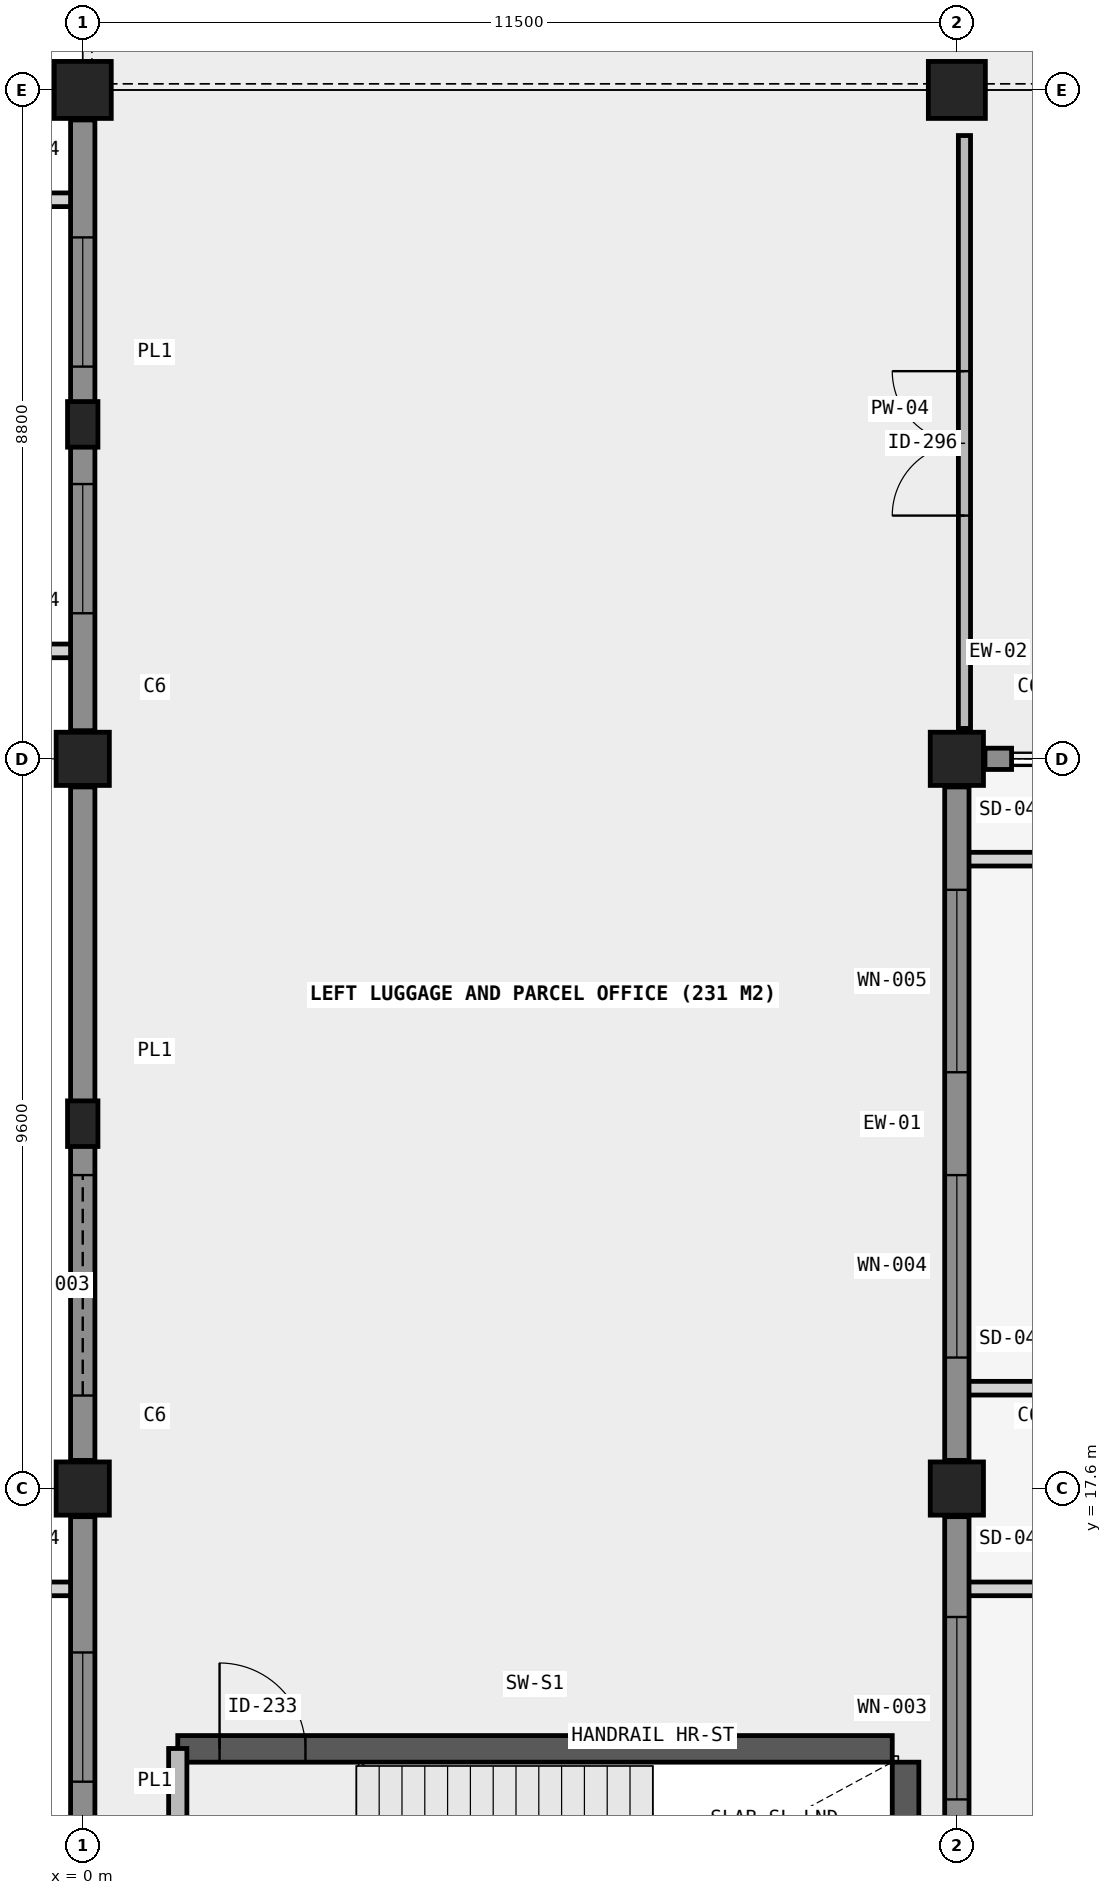
"""IFC4 building model, lengths in metres.
Left out: names, types, materials, properties, quantities, classifications, styles, units other than length and angle.
Written with IfcOpenShell. Run it as: python <this file> out.ifc"""

import sys

from ifc_helpers import new_model, si_unit, direction, frame, frame_2d, origin, origin_2d, place, context, subcontext, project, spatial, rectangle, extrude, element, fill, save


model = new_model("IFC4")
c1 = context("Model", 3, precision=1e-05, world=origin(), true_north=direction((0.0, 1.0)))
c2 = subcontext(c1, "Body", "Model", "MODEL_VIEW")
j1 = project(units=[si_unit("LENGTHUNIT", "METRE"), si_unit("PLANEANGLEUNIT", "RADIAN")], contexts=[c1])
p1 = place(None, origin())
s1 = spatial("IfcSite", under=j1, at=p1, CompositionType="ELEMENT")
p2 = place(p1, origin())
s2 = spatial("IfcBuilding", under=s1, at=p2, CompositionType="ELEMENT")
p3 = place(p2, origin())
s3 = spatial("IfcBuildingStorey", under=s2, at=p3, CompositionType="ELEMENT", Elevation=0.0)
for number, where, z_axis, x_axis in (
    (1, (0.0, 17.6, 0.0), (0.0, 0.0, 1.0), (1.0, 0.0, 0.0)),
    (2, (0.0, 27.2, 0.0), (0.0, 0.0, 1.0), (1.0, 0.0, 0.0)),
):
    element("IfcColumn", number, at=place(p3, frame(where, z_axis=z_axis, x_axis=x_axis)), inside=s3, PredefinedType="COLUMN", context=c2, shape_type="SweptSolid", body=[
        extrude(rectangle(XDim=0.7, YDim=0.7, at=origin_2d()), origin(), (0.0, 0.0, 1.0), 4.2),
    ])
p4 = place(p3, frame((0.0, 36.0, 0.0), z_axis=(0.0, 0.0, 1.0), x_axis=(1.0, 0.0, 0.0)))
e3 = element("IfcColumn", 3, at=p4, inside=s3, PredefinedType="COLUMN", context=c2, shape_type="SweptSolid", body=[
    extrude(rectangle(XDim=0.75, YDim=0.75, at=origin_2d()), origin(), (0.0, 0.0, 1.0), 4.2),
])
for number, where, z_axis, x_axis in (
    (4, (11.5, 17.6, 0.0), (0.0, 0.0, 1.0), (1.0, 0.0, 0.0)),
    (5, (11.5, 27.2, 0.0), (0.0, 0.0, 1.0), (1.0, 0.0, 0.0)),
):
    element("IfcColumn", number, at=place(p3, frame(where, z_axis=z_axis, x_axis=x_axis)), inside=s3, PredefinedType="COLUMN", context=c2, shape_type="SweptSolid", body=[
        extrude(rectangle(XDim=0.7, YDim=0.7, at=origin_2d()), origin(), (0.0, 0.0, 1.0), 4.2),
    ])
p5 = place(p3, frame((11.5, 36.0, 0.0), z_axis=(0.0, 0.0, 1.0), x_axis=(1.0, 0.0, 0.0)))
e6 = element("IfcColumn", 6, at=p5, inside=s3, PredefinedType="COLUMN", context=c2, shape_type="SweptSolid", body=[
    extrude(rectangle(XDim=0.75, YDim=0.75, at=origin_2d()), origin(), (0.0, 0.0, 1.0), 4.2),
])
for number, where, z_axis, x_axis in (
    (7, (0.0, 22.4, 0.0), (0.0, 0.0, 1.0), (1.0, 0.0, 0.0)),
    (8, (0.0, 31.6, 0.0), (0.0, 0.0, 1.0), (1.0, 0.0, 0.0)),
):
    element("IfcColumn", number, at=place(p3, frame(where, z_axis=z_axis, x_axis=x_axis)), inside=s3, PredefinedType="PILASTER", context=c2, shape_type="SweptSolid", body=[
        extrude(rectangle(XDim=0.4, YDim=0.6, at=origin_2d()), origin(), (0.0, 0.0, 1.0), 4.2),
    ])
p6 = place(p3, frame((1.25, 14.175, 0.0), z_axis=(0.0, 0.0, 1.0), x_axis=(1.0, 0.0, 0.0)))
e9 = element("IfcWall", 9, at=p6, inside=s3, PredefinedType="SHEAR", context=c2, shape_type="SweptSolid", body=[
    extrude(rectangle(XDim=9.4, YDim=0.35, at=frame_2d((4.7, 0.0))), origin(), (0.0, 0.0, 1.0), 4.2),
])
p7 = place(p6, frame((0.55, 0.0, 0.0)))
e10 = element("IfcOpeningElement", 10, at=p7, cuts=e9, PredefinedType="OPENING", context=c2, shape_type="SweptSolid", body=[
    extrude(rectangle(XDim=1.13, YDim=2.15, at=frame_2d((0.565, 1.075))), frame((0.0, 0.185, 0.0), z_axis=(0.0, -1.0, 0.0), x_axis=(1.0, 0.0, 0.0)), (0.0, 0.0, 1.0), 0.37),
])
p8 = place(p3, frame((10.825, 10.2, 0.0), z_axis=(0.0, 0.0, 1.0), x_axis=(0.0, 1.0, 0.0)))
e11 = element("IfcWall", 11, at=p8, inside=s3, PredefinedType="SHEAR", context=c2, shape_type="SweptSolid", body=[
    extrude(rectangle(XDim=3.8, YDim=0.35, at=frame_2d((1.9, 0.0))), origin(), (0.0, 0.0, 1.0), 4.2),
])
p9 = place(p3, frame((11.5, 8.47, 0.0), z_axis=(0.0, 0.0, 1.0), x_axis=(0.0, 1.0, 0.0)))
e12 = element("IfcWall", 12, at=p9, inside=s3, PredefinedType="SOLIDWALL", context=c2, shape_type="SweptSolid", body=[
    extrude(rectangle(XDim=8.76, YDim=0.32, at=frame_2d((4.38, 0.0))), origin(), (0.0, 0.0, 1.0), 3.0),
])
p10 = place(p9, frame((1.32, 0.0, 0.84)))
e13 = element("IfcOpeningElement", 13, at=p10, cuts=e12, PredefinedType="OPENING", context=c2, shape_type="SweptSolid", body=[
    extrude(rectangle(XDim=2.4, YDim=2.1, at=frame_2d((1.2, 1.05))), frame((0.0, 0.17, 0.0), z_axis=(0.0, -1.0, 0.0), x_axis=(1.0, 0.0, 0.0)), (0.0, 0.0, 1.0), 0.34),
])
p11 = place(p9, frame((5.04, 0.0, 0.84)))
e14 = element("IfcOpeningElement", 14, at=p11, cuts=e12, PredefinedType="OPENING", context=c2, shape_type="SweptSolid", body=[
    extrude(rectangle(XDim=2.4, YDim=2.1, at=frame_2d((1.2, 1.05))), frame((0.0, 0.17, 0.0), z_axis=(0.0, -1.0, 0.0), x_axis=(1.0, 0.0, 0.0)), (0.0, 0.0, 1.0), 0.34),
])
p12 = place(p3, frame((11.5, 17.97, 0.0), z_axis=(0.0, 0.0, 1.0), x_axis=(0.0, 1.0, 0.0)))
e15 = element("IfcWall", 15, at=p12, inside=s3, PredefinedType="SOLIDWALL", context=c2, shape_type="SweptSolid", body=[
    extrude(rectangle(XDim=8.86, YDim=0.32, at=frame_2d((4.43, 0.0))), origin(), (0.0, 0.0, 1.0), 3.0),
])
p13 = place(p12, frame((1.353, 0.0, 0.84)))
e16 = element("IfcOpeningElement", 16, at=p13, cuts=e15, PredefinedType="OPENING", context=c2, shape_type="SweptSolid", body=[
    extrude(rectangle(XDim=2.4, YDim=2.1, at=frame_2d((1.2, 1.05))), frame((0.0, 0.17, 0.0), z_axis=(0.0, -1.0, 0.0), x_axis=(1.0, 0.0, 0.0)), (0.0, 0.0, 1.0), 0.34),
])
p14 = place(p12, frame((5.107, 0.0, 0.84)))
e17 = element("IfcOpeningElement", 17, at=p14, cuts=e15, PredefinedType="OPENING", context=c2, shape_type="SweptSolid", body=[
    extrude(rectangle(XDim=2.4, YDim=2.1, at=frame_2d((1.2, 1.05))), frame((0.0, 0.17, 0.0), z_axis=(0.0, -1.0, 0.0), x_axis=(1.0, 0.0, 0.0)), (0.0, 0.0, 1.0), 0.34),
])
p15 = place(p3, frame((11.87, 27.2, 0.0), z_axis=(0.0, 0.0, 1.0), x_axis=(1.0, 0.0, 0.0)))
e18 = element("IfcWall", 18, at=p15, inside=s3, PredefinedType="SOLIDWALL", context=c2, shape_type="SweptSolid", body=[
    extrude(rectangle(XDim=0.35, YDim=0.28, at=frame_2d((0.175, 0.0))), origin(), (0.0, 0.0, 1.0), 3.88),
])
p16 = place(p3, frame((0.0, 8.47, 0.0), z_axis=(0.0, 0.0, 1.0), x_axis=(0.0, 1.0, 0.0)))
e19 = element("IfcWall", 19, at=p16, inside=s3, PredefinedType="SOLIDWALL", context=c2, shape_type="SweptSolid", body=[
    extrude(rectangle(XDim=8.76, YDim=0.32, at=frame_2d((4.38, 0.0))), origin(), (0.0, 0.0, 1.0), 3.2),
])
p17 = place(p16, frame((1.787, 0.0, 0.85)))
e20 = element("IfcOpeningElement", 20, at=p17, cuts=e19, PredefinedType="OPENING", context=c2, shape_type="SweptSolid", body=[
    extrude(rectangle(XDim=1.7, YDim=1.5, at=frame_2d((0.85, 0.75))), frame((0.0, 0.17, 0.0), z_axis=(0.0, -1.0, 0.0), x_axis=(1.0, 0.0, 0.0)), (0.0, 0.0, 1.0), 0.34),
])
p18 = place(p16, frame((5.273, 0.0, 0.85)))
e21 = element("IfcOpeningElement", 21, at=p18, cuts=e19, PredefinedType="OPENING", context=c2, shape_type="SweptSolid", body=[
    extrude(rectangle(XDim=1.7, YDim=1.5, at=frame_2d((0.85, 0.75))), frame((0.0, 0.17, 0.0), z_axis=(0.0, -1.0, 0.0), x_axis=(1.0, 0.0, 0.0)), (0.0, 0.0, 1.0), 0.34),
])
p19 = place(p3, frame((0.0, 17.97, 0.0), z_axis=(0.0, 0.0, 1.0), x_axis=(0.0, 1.0, 0.0)))
e22 = element("IfcWall", 22, at=p19, inside=s3, PredefinedType="SOLIDWALL", context=c2, shape_type="SweptSolid", body=[
    extrude(rectangle(XDim=8.86, YDim=0.32, at=frame_2d((4.43, 0.0))), origin(), (0.0, 0.0, 1.0), 3.2),
])
p20 = place(p19, frame((0.854, 0.0, 0.0)))
e23 = element("IfcOpeningElement", 23, at=p20, cuts=e22, PredefinedType="OPENING", context=c2, shape_type="SweptSolid", body=[
    extrude(rectangle(XDim=2.9, YDim=2.95, at=frame_2d((1.45, 1.475))), frame((0.0, 0.17, 0.0), z_axis=(0.0, -1.0, 0.0), x_axis=(1.0, 0.0, 0.0)), (0.0, 0.0, 1.0), 0.34),
])
p21 = place(p3, frame((0.0, 27.57, 0.0), z_axis=(0.0, 0.0, 1.0), x_axis=(0.0, 1.0, 0.0)))
e24 = element("IfcWall", 24, at=p21, inside=s3, PredefinedType="SOLIDWALL", context=c2, shape_type="SweptSolid", body=[
    extrude(rectangle(XDim=8.035, YDim=0.32, at=frame_2d((4.018, 0.0))), origin(), (0.0, 0.0, 1.0), 3.2),
])
p22 = place(p21, frame((1.545, 0.0, 0.85)))
e25 = element("IfcOpeningElement", 25, at=p22, cuts=e24, PredefinedType="OPENING", context=c2, shape_type="SweptSolid", body=[
    extrude(rectangle(XDim=1.7, YDim=1.5, at=frame_2d((0.85, 0.75))), frame((0.0, 0.17, 0.0), z_axis=(0.0, -1.0, 0.0), x_axis=(1.0, 0.0, 0.0)), (0.0, 0.0, 1.0), 0.34),
])
p23 = place(p21, frame((4.79, 0.0, 0.85)))
e26 = element("IfcOpeningElement", 26, at=p23, cuts=e24, PredefinedType="OPENING", context=c2, shape_type="SweptSolid", body=[
    extrude(rectangle(XDim=1.7, YDim=1.5, at=frame_2d((0.85, 0.75))), frame((0.0, 0.17, 0.0), z_axis=(0.0, -1.0, 0.0), x_axis=(1.0, 0.0, 0.0)), (0.0, 0.0, 1.0), 0.34),
])
p24 = place(p3, frame((1.25, 10.02, 0.0), z_axis=(0.0, 0.0, 1.0), x_axis=(0.0, 1.0, 0.0)))
e27 = element("IfcWall", 27, at=p24, inside=s3, PredefinedType="SOLIDWALL", context=c2, shape_type="SweptSolid", body=[
    extrude(rectangle(XDim=4.16, YDim=0.24, at=frame_2d((2.08, 0.0))), origin(), (0.0, 0.0, 1.0), 3.88),
])
p25 = place(p3, frame((11.6, 27.6, 0.0), z_axis=(0.0, 0.0, 1.0), x_axis=(0.0, 1.0, 0.0)))
e28 = element("IfcWall", 28, at=p25, inside=s3, PredefinedType="PARTITIONING", context=c2, shape_type="SweptSolid", body=[
    extrude(rectangle(XDim=7.8, YDim=0.16, at=frame_2d((3.9, 0.0))), origin(), (0.0, 0.0, 1.0), 3.0),
])
p26 = place(p25, frame((2.8, 0.0, 0.0)))
e29 = element("IfcOpeningElement", 29, at=p26, cuts=e28, PredefinedType="OPENING", context=c2, shape_type="SweptSolid", body=[
    extrude(rectangle(XDim=1.9, YDim=2.35, at=frame_2d((0.95, 1.175))), frame((0.0, 0.09, 0.0), z_axis=(0.0, -1.0, 0.0), x_axis=(1.0, 0.0, 0.0)), (0.0, 0.0, 1.0), 0.18),
])
p27 = place(p11, origin())
e30 = element("IfcWindow", 30, at=p27, inside=s3, PartitioningType="SINGLE_PANEL", PredefinedType="WINDOW", context=c2, shape_type="SweptSolid", body=[
    extrude(rectangle(XDim=2.4, YDim=2.1, at=frame_2d((1.2, 1.05))), frame((0.0, 0.03, 0.0), z_axis=(0.0, -1.0, 0.0), x_axis=(1.0, 0.0, 0.0)), (0.0, 0.0, 1.0), 0.06),
])
fill(e14, e30)
p28 = place(p13, origin())
e31 = element("IfcWindow", 31, at=p28, inside=s3, PartitioningType="SINGLE_PANEL", PredefinedType="WINDOW", context=c2, shape_type="SweptSolid", body=[
    extrude(rectangle(XDim=2.4, YDim=2.1, at=frame_2d((1.2, 1.05))), frame((0.0, 0.03, 0.0), z_axis=(0.0, -1.0, 0.0), x_axis=(1.0, 0.0, 0.0)), (0.0, 0.0, 1.0), 0.06),
])
fill(e16, e31)
p29 = place(p14, origin())
e32 = element("IfcWindow", 32, at=p29, inside=s3, PartitioningType="SINGLE_PANEL", PredefinedType="WINDOW", context=c2, shape_type="SweptSolid", body=[
    extrude(rectangle(XDim=2.4, YDim=2.1, at=frame_2d((1.2, 1.05))), frame((0.0, 0.03, 0.0), z_axis=(0.0, -1.0, 0.0), x_axis=(1.0, 0.0, 0.0)), (0.0, 0.0, 1.0), 0.06),
])
fill(e17, e32)
p30 = place(p18, origin())
e33 = element("IfcWindow", 33, at=p30, inside=s3, PartitioningType="SINGLE_PANEL", PredefinedType="WINDOW", context=c2, shape_type="SweptSolid", body=[
    extrude(rectangle(XDim=1.7, YDim=1.5, at=frame_2d((0.85, 0.75))), frame((0.0, 0.03, 0.0), z_axis=(0.0, -1.0, 0.0), x_axis=(1.0, 0.0, 0.0)), (0.0, 0.0, 1.0), 0.06),
])
fill(e21, e33)
p31 = place(p20, origin())
e34 = element("IfcDoor", 34, at=p31, inside=s3, OperationType="ROLLINGUP", PredefinedType="GATE", context=c2, shape_type="SweptSolid", body=[
    extrude(rectangle(XDim=2.9, YDim=2.95, at=frame_2d((1.45, 1.475))), frame((0.0, 0.025, 0.0), z_axis=(0.0, -1.0, 0.0), x_axis=(1.0, 0.0, 0.0)), (0.0, 0.0, 1.0), 0.05),
])
fill(e23, e34)
p32 = place(p22, origin())
e35 = element("IfcWindow", 35, at=p32, inside=s3, PartitioningType="SINGLE_PANEL", PredefinedType="WINDOW", context=c2, shape_type="SweptSolid", body=[
    extrude(rectangle(XDim=1.7, YDim=1.5, at=frame_2d((0.85, 0.75))), frame((0.0, 0.03, 0.0), z_axis=(0.0, -1.0, 0.0), x_axis=(1.0, 0.0, 0.0)), (0.0, 0.0, 1.0), 0.06),
])
fill(e25, e35)
p33 = place(p23, origin())
e36 = element("IfcWindow", 36, at=p33, inside=s3, PartitioningType="SINGLE_PANEL", PredefinedType="WINDOW", context=c2, shape_type="SweptSolid", body=[
    extrude(rectangle(XDim=1.7, YDim=1.5, at=frame_2d((0.85, 0.75))), frame((0.0, 0.03, 0.0), z_axis=(0.0, -1.0, 0.0), x_axis=(1.0, 0.0, 0.0)), (0.0, 0.0, 1.0), 0.06),
])
fill(e26, e36)
p34 = place(p7, origin())
e37 = element("IfcDoor", 37, at=p34, inside=s3, OperationType="SINGLE_SWING_LEFT", PredefinedType="DOOR", context=c2, shape_type="SweptSolid", body=[
    extrude(rectangle(XDim=1.13, YDim=2.15, at=frame_2d((0.565, 1.075))), frame((0.0, 0.025, 0.0), z_axis=(0.0, -1.0, 0.0), x_axis=(1.0, 0.0, 0.0)), (0.0, 0.0, 1.0), 0.05),
])
fill(e10, e37)
p35 = place(p26, origin())
e38 = element("IfcDoor", 38, at=p35, inside=s3, OperationType="DOUBLE_DOOR_SINGLE_SWING", PredefinedType="DOOR", context=c2, shape_type="SweptSolid", body=[
    extrude(rectangle(XDim=1.9, YDim=2.35, at=frame_2d((0.95, 1.175))), frame((0.0, 0.025, 0.0), z_axis=(0.0, -1.0, 0.0), x_axis=(1.0, 0.0, 0.0)), (0.0, 0.0, 1.0), 0.05),
])
fill(e29, e38)
save(model, sys.argv[1])
